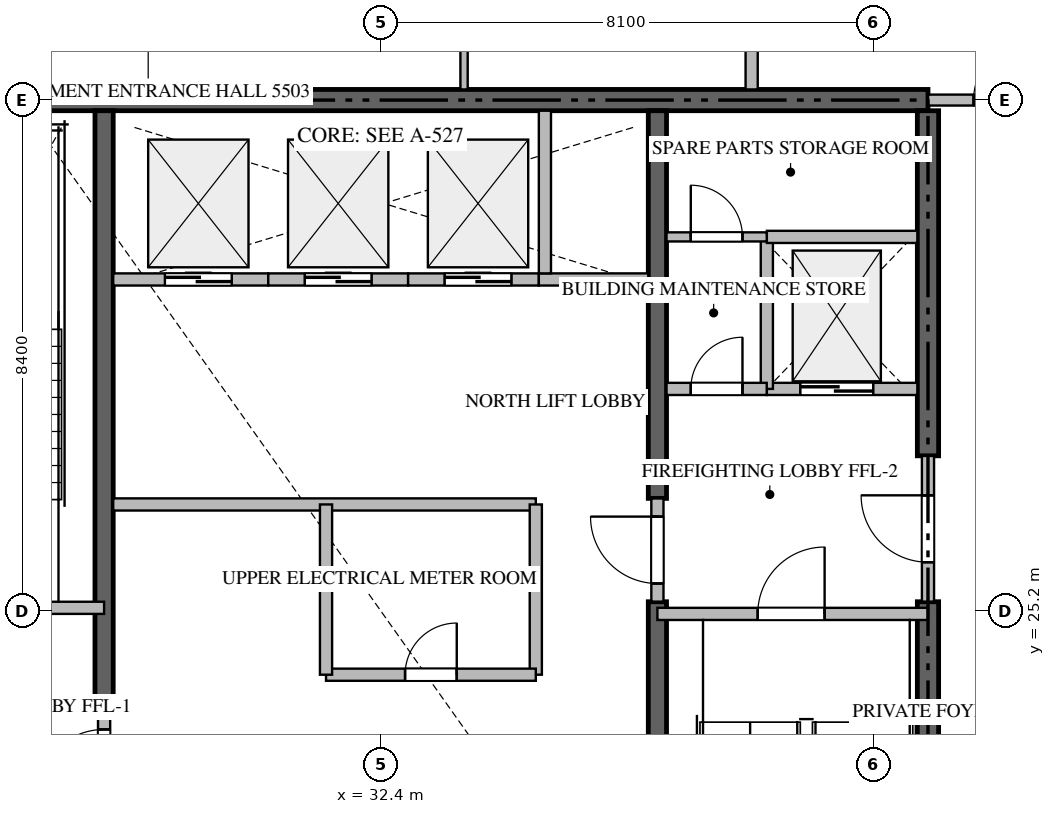
"""IFC4 building model, lengths in metres.
Left out: names, types, materials, properties, quantities, classifications, styles, units other than length and angle.
Written with IfcOpenShell. Run it as: python <this file> out.ifc"""

import sys

from ifc_helpers import new_model, si_unit, direction, frame, frame_2d, origin, place, context, subcontext, project, spatial, rectangle, extrude, source, transform, mapped, element, fill, save


model = new_model("IFC4")
c1 = context("Model", 3, precision=1e-05, world=origin(), true_north=direction((0.0, 1.0)))
c2 = subcontext(c1, "Body", "Model", "MODEL_VIEW")
j1 = project(units=[si_unit("LENGTHUNIT", "METRE"), si_unit("PLANEANGLEUNIT", "RADIAN")], contexts=[c1])
p1 = place(None, origin())
s1 = spatial("IfcSite", under=j1, at=p1, CompositionType="ELEMENT")
p2 = place(p1, origin())
s2 = spatial("IfcBuilding", under=s1, at=p2, CompositionType="ELEMENT")
p3 = place(p2, frame((0.0, 0.0, 222.0)))
s3 = spatial("IfcBuildingStorey", under=s2, at=p3, CompositionType="ELEMENT", Elevation=222.0)
p4 = place(p3, frame((41.4, 33.6, -0.26), z_axis=(0.0, 0.0, 1.0), x_axis=(-1.0, 0.0, 0.0)))
e1 = element("IfcWall", 1, at=p4, inside=s3, PredefinedType="SHEAR", context=c2, shape_type="SweptSolid", body=[
    extrude(rectangle(XDim=18.0, YDim=0.35, at=frame_2d((9.0, 0.0))), origin(), (0.0, 0.0, 1.0), 3.848),
])
p5 = place(p3, frame((41.4, 16.975, -0.26), z_axis=(0.0, 0.0, 1.0), x_axis=(0.0, 1.0, 0.0)))
e2 = element("IfcWall", 2, at=p5, inside=s3, PredefinedType="SHEAR", context=c2, shape_type="SweptSolid", body=[
    extrude(rectangle(XDim=8.375, YDim=0.35, at=frame_2d((4.188, 0.0))), origin(), (0.0, 0.0, 1.0), 3.848),
])
p6 = place(p3, frame((41.4, 27.75, -0.26), z_axis=(0.0, 0.0, 1.0), x_axis=(0.0, 1.0, 0.0)))
e3 = element("IfcWall", 3, at=p6, inside=s3, PredefinedType="SHEAR", context=c2, shape_type="SweptSolid", body=[
    extrude(rectangle(XDim=5.675, YDim=0.35, at=frame_2d((2.837, 0.0))), origin(), (0.0, 0.0, 1.0), 3.848),
])
p7 = place(p3, frame((27.85, 23.55, -0.26), z_axis=(0.0, 0.0, 1.0), x_axis=(0.0, 1.0, 0.0)))
e4 = element("IfcWall", 4, at=p7, inside=s3, PredefinedType="SHEAR", context=c2, shape_type="SweptSolid", body=[
    extrude(rectangle(XDim=9.875, YDim=0.3, at=frame_2d((4.938, 0.0))), origin(), (0.0, 0.0, 1.0), 3.848),
])
p8 = place(p3, frame((36.95, 16.975, -0.26), z_axis=(0.0, 0.0, 1.0), x_axis=(0.0, 1.0, 0.0)))
e5 = element("IfcWall", 5, at=p8, inside=s3, PredefinedType="SHEAR", context=c2, shape_type="SweptSolid", body=[
    extrude(rectangle(XDim=8.375, YDim=0.3, at=frame_2d((4.188, 0.0))), origin(), (0.0, 0.0, 1.0), 3.848),
])
p9 = place(p3, frame((36.95, 27.05, -0.26), z_axis=(0.0, 0.0, 1.0), x_axis=(0.0, 1.0, 0.0)))
e6 = element("IfcWall", 6, at=p9, inside=s3, PredefinedType="SHEAR", context=c2, shape_type="SweptSolid", body=[
    extrude(rectangle(XDim=6.375, YDim=0.3, at=frame_2d((3.188, 0.0))), origin(), (0.0, 0.0, 1.0), 3.848),
])
p10 = place(p3, frame((23.4, 25.25, 0.0), z_axis=(0.0, 0.0, 1.0), x_axis=(1.0, 0.0, 0.0)))
e7 = element("IfcWall", 7, at=p10, inside=s3, PredefinedType="STANDARD", context=c2, shape_type="SweptSolid", body=[
    extrude(rectangle(XDim=4.45, YDim=0.2, at=frame_2d((2.225, 0.0))), origin(), (0.0, 0.0, 1.0), 3.59),
])
p11 = place(p10, frame((1.65, 0.0, 0.0)))
e8 = element("IfcOpeningElement", 8, at=p11, cuts=e7, PredefinedType="OPENING", context=c2, shape_type="SweptSolid", body=[
    extrude(rectangle(XDim=1.1, YDim=2.15, at=frame_2d((0.55, 1.075))), frame((0.0, 0.11, 0.0), z_axis=(0.0, -1.0, 0.0), x_axis=(1.0, 0.0, 0.0)), (0.0, 0.0, 1.0), 0.22),
])
p12 = place(p3, frame((36.95, 25.15, 0.0), z_axis=(0.0, 0.0, 1.0), x_axis=(1.0, 0.0, 0.0)))
e9 = element("IfcWall", 9, at=p12, inside=s3, PredefinedType="STANDARD", context=c2, shape_type="SweptSolid", body=[
    extrude(rectangle(XDim=4.45, YDim=0.2, at=frame_2d((2.225, 0.0))), origin(), (0.0, 0.0, 1.0), 3.59),
])
p13 = place(p12, frame((1.65, 0.0, 0.0)))
e10 = element("IfcOpeningElement", 10, at=p13, cuts=e9, PredefinedType="OPENING", context=c2, shape_type="SweptSolid", body=[
    extrude(rectangle(XDim=1.1, YDim=2.15, at=frame_2d((0.55, 1.075))), frame((0.0, 0.11, 0.0), z_axis=(0.0, -1.0, 0.0), x_axis=(1.0, 0.0, 0.0)), (0.0, 0.0, 1.0), 0.22),
])
p14 = place(p3, frame((38.75, 28.85, 0.0), z_axis=(0.0, 0.0, 1.0), x_axis=(1.0, 0.0, 0.0)))
e11 = element("IfcWall", 11, at=p14, inside=s3, PredefinedType="STANDARD", context=c2, shape_type="SweptSolid", body=[
    extrude(rectangle(XDim=2.475, YDim=0.2, at=frame_2d((1.238, 0.0))), origin(), (0.0, 0.0, 1.0), 3.59),
])
p15 = place(p14, frame((0.55, 0.0, 0.0)))
e12 = element("IfcOpeningElement", 12, at=p15, cuts=e11, PredefinedType="OPENING", context=c2, shape_type="SweptSolid", body=[
    extrude(rectangle(XDim=1.2, YDim=2.2, at=frame_2d((0.6, 1.1))), frame((0.0, 0.11, 0.0), z_axis=(0.0, -1.0, 0.0), x_axis=(1.0, 0.0, 0.0)), (0.0, 0.0, 1.0), 0.22),
])
p16 = place(p3, frame((28.0, 30.65, 0.0), z_axis=(0.0, 0.0, 1.0), x_axis=(1.0, 0.0, 0.0)))
e13 = element("IfcWall", 13, at=p16, inside=s3, PredefinedType="STANDARD", context=c2, shape_type="SweptSolid", body=[
    extrude(rectangle(XDim=2.55, YDim=0.2, at=frame_2d((1.275, 0.0))), origin(), (0.0, 0.0, 1.0), 3.59),
])
p17 = place(p16, frame((0.85, 0.0, 0.0)))
e14 = element("IfcOpeningElement", 14, at=p17, cuts=e13, PredefinedType="OPENING", context=c2, shape_type="SweptSolid", body=[
    extrude(rectangle(XDim=1.1, YDim=2.2, at=frame_2d((0.55, 1.1))), frame((0.0, 0.11, 0.0), z_axis=(0.0, -1.0, 0.0), x_axis=(1.0, 0.0, 0.0)), (0.0, 0.0, 1.0), 0.22),
])
p18 = place(p3, frame((30.55, 30.65, 0.0), z_axis=(0.0, 0.0, 1.0), x_axis=(1.0, 0.0, 0.0)))
e15 = element("IfcWall", 15, at=p18, inside=s3, PredefinedType="STANDARD", context=c2, shape_type="SweptSolid", body=[
    extrude(rectangle(XDim=2.3, YDim=0.2, at=frame_2d((1.15, 0.0))), origin(), (0.0, 0.0, 1.0), 3.59),
])
p19 = place(p18, frame((0.6, 0.0, 0.0)))
e16 = element("IfcOpeningElement", 16, at=p19, cuts=e15, PredefinedType="OPENING", context=c2, shape_type="SweptSolid", body=[
    extrude(rectangle(XDim=1.1, YDim=2.2, at=frame_2d((0.55, 1.1))), frame((0.0, 0.11, 0.0), z_axis=(0.0, -1.0, 0.0), x_axis=(1.0, 0.0, 0.0)), (0.0, 0.0, 1.0), 0.22),
])
p20 = place(p3, frame((32.85, 30.65, 0.0), z_axis=(0.0, 0.0, 1.0), x_axis=(1.0, 0.0, 0.0)))
e17 = element("IfcWall", 17, at=p20, inside=s3, PredefinedType="STANDARD", context=c2, shape_type="SweptSolid", body=[
    extrude(rectangle(XDim=2.15, YDim=0.2, at=frame_2d((1.075, 0.0))), origin(), (0.0, 0.0, 1.0), 3.59),
])
p21 = place(p20, frame((0.6, 0.0, 0.0)))
e18 = element("IfcOpeningElement", 18, at=p21, cuts=e17, PredefinedType="OPENING", context=c2, shape_type="SweptSolid", body=[
    extrude(rectangle(XDim=1.1, YDim=2.2, at=frame_2d((0.55, 1.1))), frame((0.0, 0.11, 0.0), z_axis=(0.0, -1.0, 0.0), x_axis=(1.0, 0.0, 0.0)), (0.0, 0.0, 1.0), 0.22),
])
p22 = place(p3, frame((35.0, 30.65, 0.0), z_axis=(0.0, 0.0, 1.0), x_axis=(1.0, 0.0, 0.0)))
e19 = element("IfcWall", 19, at=p22, inside=s3, PredefinedType="STANDARD", context=c2, shape_type="SweptSolid", body=[
    extrude(rectangle(XDim=1.8, YDim=0.2, at=frame_2d((0.9, 0.0))), origin(), (0.0, 0.0, 1.0), 3.59),
])
p23 = place(p3, frame((35.1, 30.75, 0.0), z_axis=(0.0, 0.0, 1.0), x_axis=(0.0, 1.0, 0.0)))
e20 = element("IfcWall", 20, at=p23, inside=s3, PredefinedType="STANDARD", context=c2, shape_type="SweptSolid", body=[
    extrude(rectangle(XDim=2.675, YDim=0.2, at=frame_2d((1.337, 0.0))), origin(), (0.0, 0.0, 1.0), 3.59),
])
p24 = place(p3, frame((38.75, 28.85, 0.0), z_axis=(0.0, 0.0, 1.0), x_axis=(0.0, 1.0, 0.0)))
e21 = element("IfcWall", 21, at=p24, inside=s3, PredefinedType="STANDARD", context=c2, shape_type="SweptSolid", body=[
    extrude(rectangle(XDim=2.5, YDim=0.2, at=frame_2d((1.25, 0.0))), origin(), (0.0, 0.0, 1.0), 3.59),
])
p25 = place(p3, frame((38.75, 31.35, 0.0), z_axis=(0.0, 0.0, 1.0), x_axis=(1.0, 0.0, 0.0)))
e22 = element("IfcWall", 22, at=p25, inside=s3, PredefinedType="STANDARD", context=c2, shape_type="SweptSolid", body=[
    extrude(rectangle(XDim=2.475, YDim=0.2, at=frame_2d((1.238, 0.0))), origin(), (0.0, 0.0, 1.0), 3.59),
])
p26 = place(p3, frame((37.1, 28.85, 0.0), z_axis=(0.0, 0.0, 1.0), x_axis=(1.0, 0.0, 0.0)))
e23 = element("IfcWall", 23, at=p26, inside=s3, PredefinedType="STANDARD", context=c2, shape_type="SweptSolid", body=[
    extrude(rectangle(XDim=1.648, YDim=0.2, at=frame_2d((0.824, 0.0))), origin(), (0.0, 0.0, 1.0), 3.59),
])
p27 = place(p26, frame((0.399, 0.0, 0.0)))
e24 = element("IfcOpeningElement", 24, at=p27, cuts=e23, PredefinedType="OPENING", context=c2, shape_type="SweptSolid", body=[
    extrude(rectangle(XDim=0.85, YDim=2.1, at=frame_2d((0.425, 1.05))), frame((0.0, 0.11, 0.0), z_axis=(0.0, -1.0, 0.0), x_axis=(1.0, 0.0, 0.0)), (0.0, 0.0, 1.0), 0.22),
])
p28 = place(p3, frame((41.4, 25.352, 0.0), z_axis=(0.0, 0.0, 1.0), x_axis=(0.0, 1.0, 0.0)))
e25 = element("IfcWall", 25, at=p28, inside=s3, PredefinedType="STANDARD", context=c2, shape_type="SweptSolid", body=[
    extrude(rectangle(XDim=2.396, YDim=0.2, at=frame_2d((1.198, 0.0))), origin(), (0.0, 0.0, 1.0), 3.59),
])
p29 = place(p28, frame((0.648, 0.0, 0.0)))
e26 = element("IfcOpeningElement", 26, at=p29, cuts=e25, PredefinedType="OPENING", context=c2, shape_type="SweptSolid", body=[
    extrude(rectangle(XDim=1.1, YDim=2.15, at=frame_2d((0.55, 1.075))), frame((0.0, 0.11, 0.0), z_axis=(0.0, -1.0, 0.0), x_axis=(1.0, 0.0, 0.0)), (0.0, 0.0, 1.0), 0.22),
])
p30 = place(p3, frame((27.85, 21.852, 0.0), z_axis=(0.0, 0.0, 1.0), x_axis=(0.0, 1.0, 0.0)))
e27 = element("IfcWall", 27, at=p30, inside=s3, PredefinedType="STANDARD", context=c2, shape_type="SweptSolid", body=[
    extrude(rectangle(XDim=1.696, YDim=0.2, at=frame_2d((0.848, 0.0))), origin(), (0.0, 0.0, 1.0), 3.59),
])
p31 = place(p30, frame((0.298, 0.0, 0.0)))
e28 = element("IfcOpeningElement", 28, at=p31, cuts=e27, PredefinedType="OPENING", context=c2, shape_type="SweptSolid", body=[
    extrude(rectangle(XDim=1.1, YDim=2.15, at=frame_2d((0.55, 1.075))), frame((0.0, 0.11, 0.0), z_axis=(0.0, -1.0, 0.0), x_axis=(1.0, 0.0, 0.0)), (0.0, 0.0, 1.0), 0.22),
])
p32 = place(p3, frame((36.95, 25.352, 0.0), z_axis=(0.0, 0.0, 1.0), x_axis=(0.0, 1.0, 0.0)))
e29 = element("IfcWall", 29, at=p32, inside=s3, PredefinedType="STANDARD", context=c2, shape_type="SweptSolid", body=[
    extrude(rectangle(XDim=1.696, YDim=0.2, at=frame_2d((0.848, 0.0))), origin(), (0.0, 0.0, 1.0), 3.59),
])
p33 = place(p32, frame((0.298, 0.0, 0.0)))
e30 = element("IfcOpeningElement", 30, at=p33, cuts=e29, PredefinedType="OPENING", context=c2, shape_type="SweptSolid", body=[
    extrude(rectangle(XDim=1.1, YDim=2.15, at=frame_2d((0.55, 1.075))), frame((0.0, 0.11, 0.0), z_axis=(0.0, -1.0, 0.0), x_axis=(1.0, 0.0, 0.0)), (0.0, 0.0, 1.0), 0.22),
])
p34 = place(p3, frame((37.1, 31.35, 0.0), z_axis=(0.0, 0.0, 1.0), x_axis=(1.0, 0.0, 0.0)))
e31 = element("IfcWall", 31, at=p34, inside=s3, PredefinedType="PARTITIONING", context=c2, shape_type="SweptSolid", body=[
    extrude(rectangle(XDim=1.648, YDim=0.15, at=frame_2d((0.824, 0.0))), origin(), (0.0, 0.0, 1.0), 3.59),
])
p35 = place(p34, frame((0.399, 0.0, 0.0)))
e32 = element("IfcOpeningElement", 32, at=p35, cuts=e31, PredefinedType="OPENING", context=c2, shape_type="SweptSolid", body=[
    extrude(rectangle(XDim=0.85, YDim=2.1, at=frame_2d((0.425, 1.05))), frame((0.0, 0.085, 0.0), z_axis=(0.0, -1.0, 0.0), x_axis=(1.0, 0.0, 0.0)), (0.0, 0.0, 1.0), 0.17),
])
p36 = place(p3, frame((28.0, 26.95, 0.0), z_axis=(0.0, 0.0, 1.0), x_axis=(1.0, 0.0, 0.0)))
e33 = element("IfcWall", 33, at=p36, inside=s3, PredefinedType="STANDARD", context=c2, shape_type="SweptSolid", body=[
    extrude(rectangle(XDim=6.95, YDim=0.2, at=frame_2d((3.475, 0.0))), origin(), (0.0, 0.0, 1.0), 3.59),
])
p37 = place(p3, frame((34.95, 24.15, 0.0), z_axis=(0.0, 0.0, 1.0), x_axis=(0.0, 1.0, 0.0)))
e34 = element("IfcWall", 34, at=p37, inside=s3, PredefinedType="STANDARD", context=c2, shape_type="SweptSolid", body=[
    extrude(rectangle(XDim=2.8, YDim=0.2, at=frame_2d((1.4, 0.0))), origin(), (0.0, 0.0, 1.0), 3.59),
])
p38 = place(p3, frame((31.5, 24.15, 0.0), z_axis=(0.0, 0.0, 1.0), x_axis=(1.0, 0.0, 0.0)))
e35 = element("IfcWall", 35, at=p38, inside=s3, PredefinedType="STANDARD", context=c2, shape_type="SweptSolid", body=[
    extrude(rectangle(XDim=3.45, YDim=0.2, at=frame_2d((1.725, 0.0))), origin(), (0.0, 0.0, 1.0), 3.59),
])
p39 = place(p38, frame((1.3, 0.0, 0.0)))
e36 = element("IfcOpeningElement", 36, at=p39, cuts=e35, PredefinedType="OPENING", context=c2, shape_type="SweptSolid", body=[
    extrude(rectangle(XDim=0.85, YDim=2.1, at=frame_2d((0.425, 1.05))), frame((0.0, 0.11, 0.0), z_axis=(0.0, -1.0, 0.0), x_axis=(1.0, 0.0, 0.0)), (0.0, 0.0, 1.0), 0.22),
])
p40 = place(p3, frame((31.5, 24.15, 0.0), z_axis=(0.0, 0.0, 1.0), x_axis=(0.0, 1.0, 0.0)))
e37 = element("IfcWall", 37, at=p40, inside=s3, PredefinedType="STANDARD", context=c2, shape_type="SweptSolid", body=[
    extrude(rectangle(XDim=2.8, YDim=0.2, at=frame_2d((1.4, 0.0))), origin(), (0.0, 0.0, 1.0), 3.59),
])
p41 = place(p3, frame((38.5, 33.775, 0.0), z_axis=(0.0, 0.0, 1.0), x_axis=(0.0, 1.0, 0.0)))
e38 = element("IfcWall", 38, at=p41, inside=s3, PredefinedType="PARTITIONING", context=c2, shape_type="SweptSolid", body=[
    extrude(rectangle(XDim=15.343, YDim=0.2, at=frame_2d((7.671, 0.0))), origin(), (0.0, 0.0, 1.0), 3.59),
])
p42 = place(p3, frame((41.402, 33.6, 0.0), z_axis=(0.0, 0.0, 1.0), x_axis=(1.0, 0.0, 0.0)))
e39 = element("IfcWall", 39, at=p42, inside=s3, PredefinedType="PARTITIONING", context=c2, shape_type="SweptSolid", body=[
    extrude(rectangle(XDim=2.496, YDim=0.18, at=frame_2d((1.248, 0.0))), origin(), (0.0, 0.0, 1.0), 3.59),
])
p43 = place(p42, frame((0.748, 0.0, 0.0)))
e40 = element("IfcOpeningElement", 40, at=p43, cuts=e39, PredefinedType="OPENING", context=c2, shape_type="SweptSolid", body=[
    extrude(rectangle(XDim=1.0, YDim=2.15, at=frame_2d((0.5, 1.075))), frame((0.0, 0.1, 0.0), z_axis=(0.0, -1.0, 0.0), x_axis=(1.0, 0.0, 0.0)), (0.0, 0.0, 1.0), 0.2),
])
p44 = place(p3, frame((33.77, 35.748, 0.0), z_axis=(0.0, 0.0, 1.0), x_axis=(0.0, -1.0, 0.0)))
e41 = element("IfcWall", 41, at=p44, inside=s3, PredefinedType="PARTITIONING", context=c2, shape_type="SweptSolid", body=[
    extrude(rectangle(XDim=1.973, YDim=0.12, at=frame_2d((0.987, 0.0))), origin(), (0.0, 0.0, 1.0), 3.59),
])
m1 = source(origin(), c2, "Body", "SweptSolid", [
    extrude(rectangle(XDim=1.1, YDim=2.15, at=frame_2d((0.55, 1.075))), frame((0.0, 0.025, 0.0), z_axis=(0.0, -1.0, 0.0), x_axis=(1.0, 0.0, 0.0)), (0.0, 0.0, 1.0), 0.05),
])
p45 = place(p13, origin())
e42 = element("IfcDoor", 42, at=p45, inside=s3, OperationType="SINGLE_SWING_RIGHT", PredefinedType="DOOR", context=c2, shape_type="MappedRepresentation", body=[
    mapped(m1, transform((0.0, 0.0, 0.0), scale=1.0)),
])
fill(e10, e42)
m2 = source(origin(), c2, "Body", "SweptSolid", [
    extrude(rectangle(XDim=1.2, YDim=2.2, at=frame_2d((0.6, 1.1))), frame((0.0, 0.025, 0.0), z_axis=(0.0, -1.0, 0.0), x_axis=(1.0, 0.0, 0.0)), (0.0, 0.0, 1.0), 0.05),
])
p46 = place(p15, origin())
e43 = element("IfcDoor", 43, at=p46, inside=s3, OperationType="DOUBLE_DOOR_SLIDING", PredefinedType="DOOR", context=c2, shape_type="MappedRepresentation", body=[
    mapped(m2, transform((0.0, 0.0, 0.0), scale=1.0)),
])
fill(e12, e43)
m3 = source(origin(), c2, "Body", "SweptSolid", [
    extrude(rectangle(XDim=1.1, YDim=2.2, at=frame_2d((0.55, 1.1))), frame((0.0, 0.025, 0.0), z_axis=(0.0, -1.0, 0.0), x_axis=(1.0, 0.0, 0.0)), (0.0, 0.0, 1.0), 0.05),
])
p47 = place(p17, origin())
e44 = element("IfcDoor", 44, at=p47, inside=s3, OperationType="DOUBLE_DOOR_SLIDING", PredefinedType="DOOR", context=c2, shape_type="MappedRepresentation", body=[
    mapped(m3, transform((0.0, 0.0, 0.0), scale=1.0)),
])
fill(e14, e44)
p48 = place(p19, origin())
e45 = element("IfcDoor", 45, at=p48, inside=s3, OperationType="DOUBLE_DOOR_SLIDING", PredefinedType="DOOR", context=c2, shape_type="MappedRepresentation", body=[
    mapped(m3, transform((0.0, 0.0, 0.0), scale=1.0)),
])
fill(e16, e45)
p49 = place(p21, origin())
e46 = element("IfcDoor", 46, at=p49, inside=s3, OperationType="DOUBLE_DOOR_SLIDING", PredefinedType="DOOR", context=c2, shape_type="MappedRepresentation", body=[
    mapped(m3, transform((0.0, 0.0, 0.0), scale=1.0)),
])
fill(e18, e46)
m4 = source(origin(), c2, "Body", "SweptSolid", [
    extrude(rectangle(XDim=0.85, YDim=2.1, at=frame_2d((0.425, 1.05))), frame((0.0, 0.025, 0.0), z_axis=(0.0, -1.0, 0.0), x_axis=(1.0, 0.0, 0.0)), (0.0, 0.0, 1.0), 0.05),
])
p50 = place(p27, origin())
e47 = element("IfcDoor", 47, at=p50, inside=s3, OperationType="SINGLE_SWING_RIGHT", PredefinedType="DOOR", context=c2, shape_type="MappedRepresentation", body=[
    mapped(m4, transform((0.0, 0.0, 0.0), scale=1.0)),
])
fill(e24, e47)
p51 = place(p29, origin())
e48 = element("IfcDoor", 48, at=p51, inside=s3, OperationType="SINGLE_SWING_RIGHT", PredefinedType="DOOR", context=c2, shape_type="MappedRepresentation", body=[
    mapped(m1, transform((0.0, 0.0, 0.0), scale=1.0)),
])
fill(e26, e48)
p52 = place(p31, origin())
e49 = element("IfcDoor", 49, at=p52, inside=s3, OperationType="SINGLE_SWING_LEFT", PredefinedType="DOOR", context=c2, shape_type="MappedRepresentation", body=[
    mapped(m1, transform((0.0, 0.0, 0.0), scale=1.0)),
])
fill(e28, e49)
p53 = place(p33, origin())
e50 = element("IfcDoor", 50, at=p53, inside=s3, OperationType="SINGLE_SWING_RIGHT", PredefinedType="DOOR", context=c2, shape_type="MappedRepresentation", body=[
    mapped(m1, transform((0.0, 0.0, 0.0), scale=1.0)),
])
fill(e30, e50)
p54 = place(p35, origin())
e51 = element("IfcDoor", 51, at=p54, inside=s3, OperationType="SINGLE_SWING_LEFT", PredefinedType="DOOR", context=c2, shape_type="MappedRepresentation", body=[
    mapped(m4, transform((0.0, 0.0, 0.0), scale=1.0)),
])
fill(e32, e51)
p55 = place(p39, origin())
e52 = element("IfcDoor", 52, at=p55, inside=s3, OperationType="SINGLE_SWING_RIGHT", PredefinedType="DOOR", context=c2, shape_type="MappedRepresentation", body=[
    mapped(m4, transform((0.0, 0.0, 0.0), scale=1.0)),
])
fill(e36, e52)
m5 = source(origin(), c2, "Body", "SweptSolid", [
    extrude(rectangle(XDim=1.0, YDim=2.15, at=frame_2d((0.5, 1.075))), frame((0.0, 0.025, 0.0), z_axis=(0.0, -1.0, 0.0), x_axis=(1.0, 0.0, 0.0)), (0.0, 0.0, 1.0), 0.05),
])
p56 = place(p43, origin())
e53 = element("IfcDoor", 53, at=p56, inside=s3, OperationType="SINGLE_SWING_RIGHT", PredefinedType="DOOR", context=c2, shape_type="MappedRepresentation", body=[
    mapped(m5, transform((0.0, 0.0, 0.0), scale=1.0)),
])
fill(e40, e53)
save(model, sys.argv[1])
